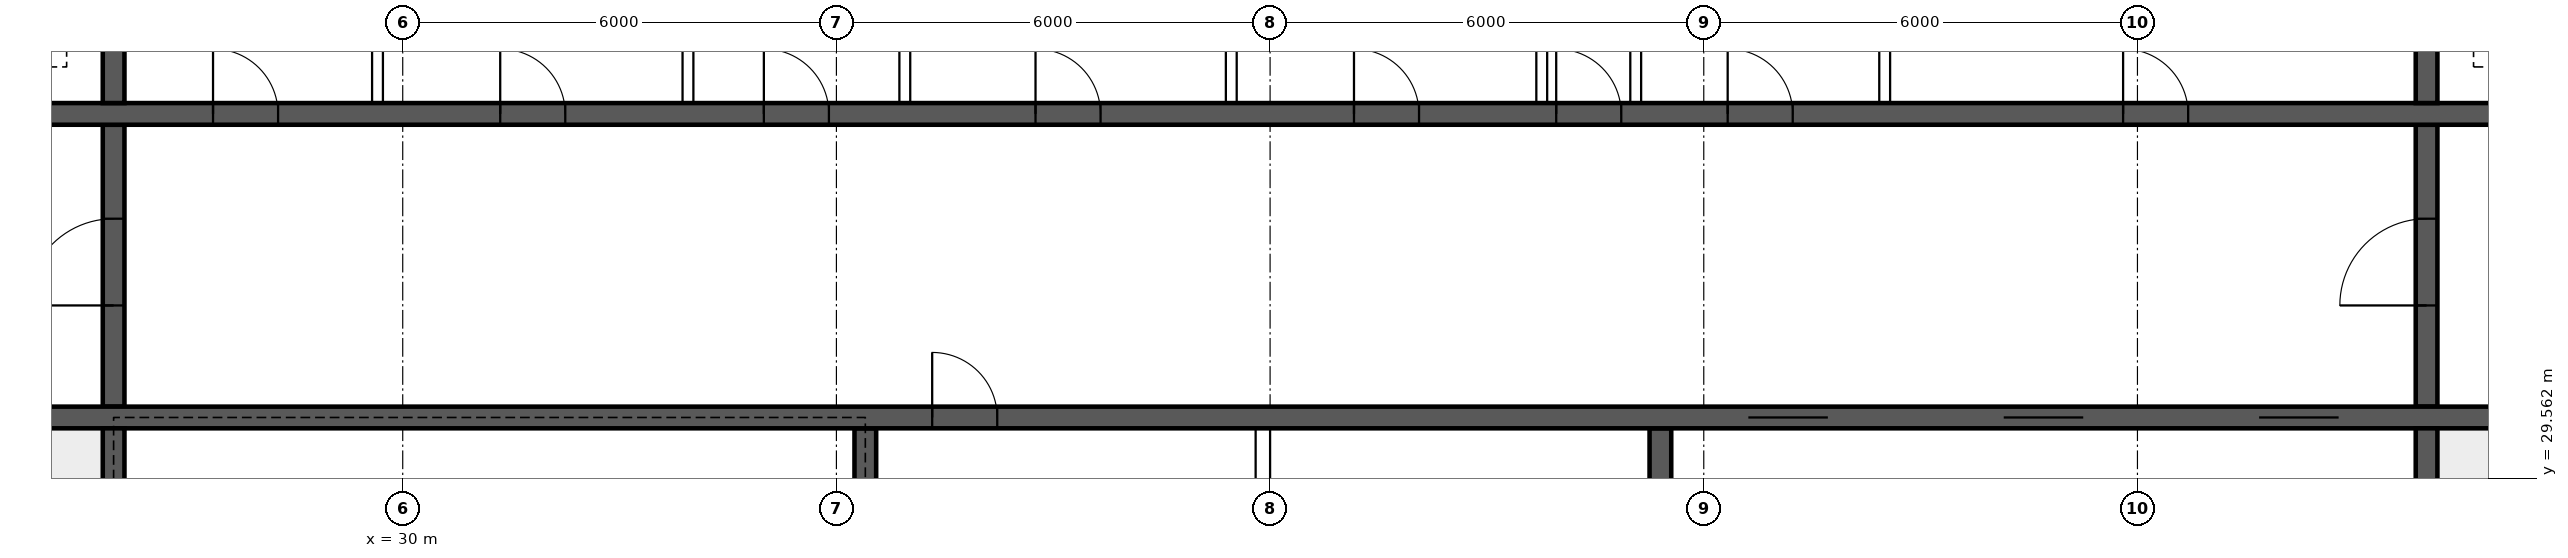
"""IFC4 building model, lengths in metres.
Left out: names, types, materials, properties, quantities, classifications, styles, units other than length and angle.
Written with IfcOpenShell. Run it as: python <this file> out.ifc"""

import sys

from ifc_helpers import new_model, si_unit, direction, frame, frame_2d, origin, place, context, subcontext, project, spatial, rectangle, extrude, element, fill, save


model = new_model("IFC4")
c1 = context("Model", 3, precision=1e-05, world=origin(), true_north=direction((0.0, 1.0)))
c2 = subcontext(c1, "Body", "Model", "MODEL_VIEW")
j1 = project(units=[si_unit("LENGTHUNIT", "METRE"), si_unit("PLANEANGLEUNIT", "RADIAN")], contexts=[c1])
p1 = place(None, origin())
s1 = spatial("IfcSite", under=j1, at=p1, CompositionType="ELEMENT")
p2 = place(p1, origin())
s2 = spatial("IfcBuilding", under=s1, at=p2, CompositionType="ELEMENT")
p3 = place(p2, frame((0.0, 0.0, 201.1)))
s3 = spatial("IfcBuildingStorey", under=s2, at=p3, CompositionType="ELEMENT", Elevation=201.1)
p4 = place(p3, frame((18.425, 30.4, 0.0), z_axis=(0.0, 0.0, 1.0), x_axis=(1.0, 0.0, 0.0)))
e1 = element("IfcWall", 1, at=p4, inside=s3, PredefinedType="SHEAR", context=c2, shape_type="SweptSolid", body=[
    extrude(rectangle(XDim=47.15, YDim=0.3, at=frame_2d((23.575, 0.0))), origin(), (0.0, 0.0, 1.0), 7.2),
])
p5 = place(p4, frame((0.4, 0.0, 0.0)))
e2 = element("IfcOpeningElement", 2, at=p5, cuts=e1, PredefinedType="OPENING", context=c2, shape_type="SweptSolid", body=[
    extrude(rectangle(XDim=1.0, YDim=2.1, at=frame_2d((0.5, 1.05))), frame((0.0, 0.16, 0.0), z_axis=(0.0, -1.0, 0.0), x_axis=(1.0, 0.0, 0.0)), (0.0, 0.0, 1.0), 0.32),
])
p6 = place(p4, frame((45.75, 0.0, 0.0)))
e3 = element("IfcOpeningElement", 3, at=p6, cuts=e1, PredefinedType="OPENING", context=c2, shape_type="SweptSolid", body=[
    extrude(rectangle(XDim=1.0, YDim=2.1, at=frame_2d((0.5, 1.05))), frame((0.0, 0.16, 0.0), z_axis=(0.0, -1.0, 0.0), x_axis=(1.0, 0.0, 0.0)), (0.0, 0.0, 1.0), 0.32),
])
p7 = place(p4, frame((18.9, 0.0, 0.0)))
e4 = element("IfcOpeningElement", 4, at=p7, cuts=e1, PredefinedType="OPENING", context=c2, shape_type="SweptSolid", body=[
    extrude(rectangle(XDim=0.9, YDim=2.1, at=frame_2d((0.45, 1.05))), frame((0.0, 0.16, 0.0), z_axis=(0.0, -1.0, 0.0), x_axis=(1.0, 0.0, 0.0)), (0.0, 0.0, 1.0), 0.32),
])
p8 = place(p4, frame((30.192, 0.0, 0.0)))
e5 = element("IfcOpeningElement", 5, at=p8, cuts=e1, PredefinedType="OPENING", context=c2, shape_type="SweptSolid", body=[
    extrude(rectangle(XDim=1.1, YDim=2.1, at=frame_2d((0.55, 1.05))), frame((0.0, 0.16, 0.0), z_axis=(0.0, -1.0, 0.0), x_axis=(1.0, 0.0, 0.0)), (0.0, 0.0, 1.0), 0.32),
])
p9 = place(p4, frame((33.725, 0.0, 0.0)))
e6 = element("IfcOpeningElement", 6, at=p9, cuts=e1, PredefinedType="OPENING", context=c2, shape_type="SweptSolid", body=[
    extrude(rectangle(XDim=1.1, YDim=2.1, at=frame_2d((0.55, 1.05))), frame((0.0, 0.16, 0.0), z_axis=(0.0, -1.0, 0.0), x_axis=(1.0, 0.0, 0.0)), (0.0, 0.0, 1.0), 0.32),
])
p10 = place(p4, frame((37.258, 0.0, 0.0)))
e7 = element("IfcOpeningElement", 7, at=p10, cuts=e1, PredefinedType="OPENING", context=c2, shape_type="SweptSolid", body=[
    extrude(rectangle(XDim=1.1, YDim=2.1, at=frame_2d((0.55, 1.05))), frame((0.0, 0.16, 0.0), z_axis=(0.0, -1.0, 0.0), x_axis=(1.0, 0.0, 0.0)), (0.0, 0.0, 1.0), 0.32),
])
p11 = place(p3, frame((18.425, 34.6, 0.0), z_axis=(0.0, 0.0, 1.0), x_axis=(1.0, 0.0, 0.0)))
e8 = element("IfcWall", 8, at=p11, inside=s3, PredefinedType="SHEAR", context=c2, shape_type="SweptSolid", body=[
    extrude(rectangle(XDim=47.15, YDim=0.3, at=frame_2d((23.575, 0.0))), origin(), (0.0, 0.0, 1.0), 7.2),
])
p12 = place(p11, frame((0.9, 0.0, 0.0)))
e9 = element("IfcOpeningElement", 9, at=p12, cuts=e8, PredefinedType="OPENING", context=c2, shape_type="SweptSolid", body=[
    extrude(rectangle(XDim=1.1, YDim=2.1, at=frame_2d((0.55, 1.05))), frame((0.0, 0.16, 0.0), z_axis=(0.0, -1.0, 0.0), x_axis=(1.0, 0.0, 0.0)), (0.0, 0.0, 1.0), 0.32),
])
p13 = place(p11, frame((45.15, 0.0, 0.0)))
e10 = element("IfcOpeningElement", 10, at=p13, cuts=e8, PredefinedType="OPENING", context=c2, shape_type="SweptSolid", body=[
    extrude(rectangle(XDim=1.1, YDim=2.1, at=frame_2d((0.55, 1.05))), frame((0.0, 0.16, 0.0), z_axis=(0.0, -1.0, 0.0), x_axis=(1.0, 0.0, 0.0)), (0.0, 0.0, 1.0), 0.32),
])
p14 = place(p11, frame((4.175, 0.0, 0.0)))
e11 = element("IfcOpeningElement", 11, at=p14, cuts=e8, PredefinedType="OPENING", context=c2, shape_type="SweptSolid", body=[
    extrude(rectangle(XDim=0.9, YDim=2.1, at=frame_2d((0.45, 1.05))), frame((0.0, 0.16, 0.0), z_axis=(0.0, -1.0, 0.0), x_axis=(1.0, 0.0, 0.0)), (0.0, 0.0, 1.0), 0.32),
])
p15 = place(p11, frame((42.075, 0.0, 0.0)))
e12 = element("IfcOpeningElement", 12, at=p15, cuts=e8, PredefinedType="OPENING", context=c2, shape_type="SweptSolid", body=[
    extrude(rectangle(XDim=0.9, YDim=2.1, at=frame_2d((0.45, 1.05))), frame((0.0, 0.16, 0.0), z_axis=(0.0, -1.0, 0.0), x_axis=(1.0, 0.0, 0.0)), (0.0, 0.0, 1.0), 0.32),
])
p16 = place(p11, frame((8.95, 0.0, 0.0)))
e13 = element("IfcOpeningElement", 13, at=p16, cuts=e8, PredefinedType="OPENING", context=c2, shape_type="SweptSolid", body=[
    extrude(rectangle(XDim=0.9, YDim=2.1, at=frame_2d((0.45, 1.05))), frame((0.0, 0.16, 0.0), z_axis=(0.0, -1.0, 0.0), x_axis=(1.0, 0.0, 0.0)), (0.0, 0.0, 1.0), 0.32),
])
p17 = place(p11, frame((12.924, 0.0, 0.0)))
e14 = element("IfcOpeningElement", 14, at=p17, cuts=e8, PredefinedType="OPENING", context=c2, shape_type="SweptSolid", body=[
    extrude(rectangle(XDim=0.9, YDim=2.1, at=frame_2d((0.45, 1.05))), frame((0.0, 0.16, 0.0), z_axis=(0.0, -1.0, 0.0), x_axis=(1.0, 0.0, 0.0)), (0.0, 0.0, 1.0), 0.32),
])
p18 = place(p11, frame((16.571, 0.0, 0.0)))
e15 = element("IfcOpeningElement", 15, at=p18, cuts=e8, PredefinedType="OPENING", context=c2, shape_type="SweptSolid", body=[
    extrude(rectangle(XDim=0.9, YDim=2.1, at=frame_2d((0.45, 1.05))), frame((0.0, 0.16, 0.0), z_axis=(0.0, -1.0, 0.0), x_axis=(1.0, 0.0, 0.0)), (0.0, 0.0, 1.0), 0.32),
])
p19 = place(p11, frame((20.33, 0.0, 0.0)))
e16 = element("IfcOpeningElement", 16, at=p19, cuts=e8, PredefinedType="OPENING", context=c2, shape_type="SweptSolid", body=[
    extrude(rectangle(XDim=0.9, YDim=2.1, at=frame_2d((0.45, 1.05))), frame((0.0, 0.16, 0.0), z_axis=(0.0, -1.0, 0.0), x_axis=(1.0, 0.0, 0.0)), (0.0, 0.0, 1.0), 0.32),
])
p20 = place(p11, frame((24.736, 0.0, 0.0)))
e17 = element("IfcOpeningElement", 17, at=p20, cuts=e8, PredefinedType="OPENING", context=c2, shape_type="SweptSolid", body=[
    extrude(rectangle(XDim=0.9, YDim=2.1, at=frame_2d((0.45, 1.05))), frame((0.0, 0.16, 0.0), z_axis=(0.0, -1.0, 0.0), x_axis=(1.0, 0.0, 0.0)), (0.0, 0.0, 1.0), 0.32),
])
p21 = place(p11, frame((27.533, 0.0, 0.0)))
e18 = element("IfcOpeningElement", 18, at=p21, cuts=e8, PredefinedType="OPENING", context=c2, shape_type="SweptSolid", body=[
    extrude(rectangle(XDim=0.9, YDim=2.1, at=frame_2d((0.45, 1.05))), frame((0.0, 0.16, 0.0), z_axis=(0.0, -1.0, 0.0), x_axis=(1.0, 0.0, 0.0)), (0.0, 0.0, 1.0), 0.32),
])
p22 = place(p11, frame((29.906, 0.0, 0.0)))
e19 = element("IfcOpeningElement", 19, at=p22, cuts=e8, PredefinedType="OPENING", context=c2, shape_type="SweptSolid", body=[
    extrude(rectangle(XDim=0.9, YDim=2.1, at=frame_2d((0.45, 1.05))), frame((0.0, 0.16, 0.0), z_axis=(0.0, -1.0, 0.0), x_axis=(1.0, 0.0, 0.0)), (0.0, 0.0, 1.0), 0.32),
])
p23 = place(p11, frame((35.376, 0.0, 0.0)))
e20 = element("IfcOpeningElement", 20, at=p23, cuts=e8, PredefinedType="OPENING", context=c2, shape_type="SweptSolid", body=[
    extrude(rectangle(XDim=0.9, YDim=2.1, at=frame_2d((0.45, 1.05))), frame((0.0, 0.16, 0.0), z_axis=(0.0, -1.0, 0.0), x_axis=(1.0, 0.0, 0.0)), (0.0, 0.0, 1.0), 0.32),
])
for number, where, z_axis, x_axis in (
    (21, (26.0, 26.225, 0.0), (0.0, 0.0, 1.0), (0.0, 1.0, 0.0)),
    (22, (58.0, 26.225, 0.0), (0.0, 0.0, 1.0), (0.0, 1.0, 0.0)),
):
    element("IfcWall", number, at=place(p3, frame(where, z_axis=z_axis, x_axis=x_axis)), inside=s3, PredefinedType="SHEAR", context=c2, shape_type="SweptSolid", body=[
        extrude(rectangle(XDim=4.025, YDim=0.3, at=frame_2d((2.012, 0.0))), origin(), (0.0, 0.0, 1.0), 7.2),
    ])
p24 = place(p3, frame((26.0, 30.55, 0.0), z_axis=(0.0, 0.0, 1.0), x_axis=(0.0, 1.0, 0.0)))
e23 = element("IfcWall", 23, at=p24, inside=s3, PredefinedType="SHEAR", context=c2, shape_type="SweptSolid", body=[
    extrude(rectangle(XDim=3.9, YDim=0.3, at=frame_2d((1.95, 0.0))), origin(), (0.0, 0.0, 1.0), 7.2),
])
p25 = place(p24, frame((1.4, 0.0, 0.0)))
e24 = element("IfcOpeningElement", 24, at=p25, cuts=e23, PredefinedType="OPENING", context=c2, shape_type="SweptSolid", body=[
    extrude(rectangle(XDim=1.2, YDim=2.1, at=frame_2d((0.6, 1.05))), frame((0.0, 0.16, 0.0), z_axis=(0.0, -1.0, 0.0), x_axis=(1.0, 0.0, 0.0)), (0.0, 0.0, 1.0), 0.32),
])
p26 = place(p3, frame((58.0, 30.55, 0.0), z_axis=(0.0, 0.0, 1.0), x_axis=(0.0, 1.0, 0.0)))
e25 = element("IfcWall", 25, at=p26, inside=s3, PredefinedType="SHEAR", context=c2, shape_type="SweptSolid", body=[
    extrude(rectangle(XDim=3.9, YDim=0.3, at=frame_2d((1.95, 0.0))), origin(), (0.0, 0.0, 1.0), 7.2),
])
p27 = place(p26, frame((1.4, 0.0, 0.0)))
e26 = element("IfcOpeningElement", 26, at=p27, cuts=e25, PredefinedType="OPENING", context=c2, shape_type="SweptSolid", body=[
    extrude(rectangle(XDim=1.2, YDim=2.1, at=frame_2d((0.6, 1.05))), frame((0.0, 0.16, 0.0), z_axis=(0.0, -1.0, 0.0), x_axis=(1.0, 0.0, 0.0)), (0.0, 0.0, 1.0), 0.32),
])
for number, where, z_axis, x_axis in (
    (27, (26.0, 34.75, 0.0), (0.0, 0.0, 1.0), (0.0, 1.0, 0.0)),
    (28, (58.0, 34.75, 0.0), (0.0, 0.0, 1.0), (0.0, 1.0, 0.0)),
):
    element("IfcWall", number, at=place(p3, frame(where, z_axis=z_axis, x_axis=x_axis)), inside=s3, PredefinedType="SHEAR", context=c2, shape_type="SweptSolid", body=[
        extrude(rectangle(XDim=3.025, YDim=0.3, at=frame_2d((1.512, 0.0))), origin(), (0.0, 0.0, 1.0), 7.2),
    ])
for number, where, z_axis, x_axis in (
    (29, (36.4, 26.225, 0.0), (0.0, 0.0, 1.0), (0.0, 1.0, 0.0)),
    (30, (47.4, 26.225, 0.0), (0.0, 0.0, 1.0), (0.0, 1.0, 0.0)),
):
    element("IfcWall", number, at=place(p3, frame(where, z_axis=z_axis, x_axis=x_axis)), inside=s3, PredefinedType="SHEAR", context=c2, shape_type="SweptSolid", body=[
        extrude(rectangle(XDim=4.025, YDim=0.3, at=frame_2d((2.012, 0.0))), origin(), (0.0, 0.0, 1.0), 7.2),
    ])
for number, where, z_axis, x_axis in (
    (31, (29.651, 34.75, 0.0), (0.0, 0.0, 1.0), (0.0, 1.0, 0.0)),
    (32, (33.946, 34.75, 0.0), (0.0, 0.0, 1.0), (0.0, 1.0, 0.0)),
    (33, (36.946, 34.75, 0.0), (0.0, 0.0, 1.0), (0.0, 1.0, 0.0)),
    (34, (41.463, 34.75, 0.0), (0.0, 0.0, 1.0), (0.0, 1.0, 0.0)),
    (35, (45.758, 34.75, 0.0), (0.0, 0.0, 1.0), (0.0, 1.0, 0.0)),
    (36, (47.058, 34.75, 0.0), (0.0, 0.0, 1.0), (0.0, 1.0, 0.0)),
    (37, (50.503, 34.75, 0.0), (0.0, 0.0, 1.0), (0.0, 1.0, 0.0)),
):
    element("IfcWall", number, at=place(p3, frame(where, z_axis=z_axis, x_axis=x_axis)), inside=s3, PredefinedType="SOLIDWALL", context=c2, shape_type="SweptSolid", body=[
        extrude(rectangle(XDim=3.025, YDim=0.15, at=frame_2d((1.512, 0.0))), origin(), (0.0, 0.0, 1.0), 6.9),
    ])
p28 = place(p3, frame((41.9, 26.225, 0.0), z_axis=(0.0, 0.0, 1.0), x_axis=(0.0, 1.0, 0.0)))
e38 = element("IfcWall", 38, at=p28, inside=s3, PredefinedType="SOLIDWALL", context=c2, shape_type="SweptSolid", body=[
    extrude(rectangle(XDim=4.025, YDim=0.2, at=frame_2d((2.012, 0.0))), origin(), (0.0, 0.0, 1.0), 6.9),
])
p29 = place(p25, origin())
e39 = element("IfcDoor", 39, at=p29, inside=s3, OperationType="SINGLE_SWING_LEFT", PredefinedType="DOOR", context=c2, shape_type="SweptSolid", body=[
    extrude(rectangle(XDim=1.2, YDim=2.1, at=frame_2d((0.6, 1.05))), frame((0.0, 0.025, 0.0), z_axis=(0.0, -1.0, 0.0), x_axis=(1.0, 0.0, 0.0)), (0.0, 0.0, 1.0), 0.05),
])
fill(e24, e39)
p30 = place(p27, origin())
e40 = element("IfcDoor", 40, at=p30, inside=s3, OperationType="SINGLE_SWING_LEFT", PredefinedType="DOOR", context=c2, shape_type="SweptSolid", body=[
    extrude(rectangle(XDim=1.2, YDim=2.1, at=frame_2d((0.6, 1.05))), frame((0.0, 0.025, 0.0), z_axis=(0.0, -1.0, 0.0), x_axis=(1.0, 0.0, 0.0)), (0.0, 0.0, 1.0), 0.05),
])
fill(e26, e40)
p31 = place(p16, origin())
e41 = element("IfcDoor", 41, at=p31, inside=s3, OperationType="SINGLE_SWING_LEFT", PredefinedType="DOOR", context=c2, shape_type="SweptSolid", body=[
    extrude(rectangle(XDim=0.9, YDim=2.1, at=frame_2d((0.45, 1.05))), frame((0.0, 0.025, 0.0), z_axis=(0.0, -1.0, 0.0), x_axis=(1.0, 0.0, 0.0)), (0.0, 0.0, 1.0), 0.05),
])
fill(e13, e41)
p32 = place(p17, origin())
e42 = element("IfcDoor", 42, at=p32, inside=s3, OperationType="SINGLE_SWING_LEFT", PredefinedType="DOOR", context=c2, shape_type="SweptSolid", body=[
    extrude(rectangle(XDim=0.9, YDim=2.1, at=frame_2d((0.45, 1.05))), frame((0.0, 0.025, 0.0), z_axis=(0.0, -1.0, 0.0), x_axis=(1.0, 0.0, 0.0)), (0.0, 0.0, 1.0), 0.05),
])
fill(e14, e42)
p33 = place(p18, origin())
e43 = element("IfcDoor", 43, at=p33, inside=s3, OperationType="SINGLE_SWING_LEFT", PredefinedType="DOOR", context=c2, shape_type="SweptSolid", body=[
    extrude(rectangle(XDim=0.9, YDim=2.1, at=frame_2d((0.45, 1.05))), frame((0.0, 0.025, 0.0), z_axis=(0.0, -1.0, 0.0), x_axis=(1.0, 0.0, 0.0)), (0.0, 0.0, 1.0), 0.05),
])
fill(e15, e43)
p34 = place(p19, origin())
e44 = element("IfcDoor", 44, at=p34, inside=s3, OperationType="SINGLE_SWING_LEFT", PredefinedType="DOOR", context=c2, shape_type="SweptSolid", body=[
    extrude(rectangle(XDim=0.9, YDim=2.1, at=frame_2d((0.45, 1.05))), frame((0.0, 0.025, 0.0), z_axis=(0.0, -1.0, 0.0), x_axis=(1.0, 0.0, 0.0)), (0.0, 0.0, 1.0), 0.05),
])
fill(e16, e44)
p35 = place(p20, origin())
e45 = element("IfcDoor", 45, at=p35, inside=s3, OperationType="SINGLE_SWING_LEFT", PredefinedType="DOOR", context=c2, shape_type="SweptSolid", body=[
    extrude(rectangle(XDim=0.9, YDim=2.1, at=frame_2d((0.45, 1.05))), frame((0.0, 0.025, 0.0), z_axis=(0.0, -1.0, 0.0), x_axis=(1.0, 0.0, 0.0)), (0.0, 0.0, 1.0), 0.05),
])
fill(e17, e45)
p36 = place(p21, origin())
e46 = element("IfcDoor", 46, at=p36, inside=s3, OperationType="SINGLE_SWING_LEFT", PredefinedType="DOOR", context=c2, shape_type="SweptSolid", body=[
    extrude(rectangle(XDim=0.9, YDim=2.1, at=frame_2d((0.45, 1.05))), frame((0.0, 0.025, 0.0), z_axis=(0.0, -1.0, 0.0), x_axis=(1.0, 0.0, 0.0)), (0.0, 0.0, 1.0), 0.05),
])
fill(e18, e46)
p37 = place(p22, origin())
e47 = element("IfcDoor", 47, at=p37, inside=s3, OperationType="SINGLE_SWING_LEFT", PredefinedType="DOOR", context=c2, shape_type="SweptSolid", body=[
    extrude(rectangle(XDim=0.9, YDim=2.1, at=frame_2d((0.45, 1.05))), frame((0.0, 0.025, 0.0), z_axis=(0.0, -1.0, 0.0), x_axis=(1.0, 0.0, 0.0)), (0.0, 0.0, 1.0), 0.05),
])
fill(e19, e47)
p38 = place(p23, origin())
e48 = element("IfcDoor", 48, at=p38, inside=s3, OperationType="SINGLE_SWING_LEFT", PredefinedType="DOOR", context=c2, shape_type="SweptSolid", body=[
    extrude(rectangle(XDim=0.9, YDim=2.1, at=frame_2d((0.45, 1.05))), frame((0.0, 0.025, 0.0), z_axis=(0.0, -1.0, 0.0), x_axis=(1.0, 0.0, 0.0)), (0.0, 0.0, 1.0), 0.05),
])
fill(e20, e48)
p39 = place(p7, origin())
e49 = element("IfcDoor", 49, at=p39, inside=s3, OperationType="SINGLE_SWING_LEFT", PredefinedType="DOOR", context=c2, shape_type="SweptSolid", body=[
    extrude(rectangle(XDim=0.9, YDim=2.1, at=frame_2d((0.45, 1.05))), frame((0.0, 0.025, 0.0), z_axis=(0.0, -1.0, 0.0), x_axis=(1.0, 0.0, 0.0)), (0.0, 0.0, 1.0), 0.05),
])
fill(e4, e49)
p40 = place(p8, origin())
e50 = element("IfcDoor", 50, at=p40, inside=s3, OperationType="DOUBLE_DOOR_SLIDING", PredefinedType="DOOR", context=c2, shape_type="SweptSolid", body=[
    extrude(rectangle(XDim=1.1, YDim=2.1, at=frame_2d((0.55, 1.05))), frame((0.0, 0.025, 0.0), z_axis=(0.0, -1.0, 0.0), x_axis=(1.0, 0.0, 0.0)), (0.0, 0.0, 1.0), 0.05),
])
fill(e5, e50)
p41 = place(p9, origin())
e51 = element("IfcDoor", 51, at=p41, inside=s3, OperationType="DOUBLE_DOOR_SLIDING", PredefinedType="DOOR", context=c2, shape_type="SweptSolid", body=[
    extrude(rectangle(XDim=1.1, YDim=2.1, at=frame_2d((0.55, 1.05))), frame((0.0, 0.025, 0.0), z_axis=(0.0, -1.0, 0.0), x_axis=(1.0, 0.0, 0.0)), (0.0, 0.0, 1.0), 0.05),
])
fill(e6, e51)
p42 = place(p10, origin())
e52 = element("IfcDoor", 52, at=p42, inside=s3, OperationType="DOUBLE_DOOR_SLIDING", PredefinedType="DOOR", context=c2, shape_type="SweptSolid", body=[
    extrude(rectangle(XDim=1.1, YDim=2.1, at=frame_2d((0.55, 1.05))), frame((0.0, 0.025, 0.0), z_axis=(0.0, -1.0, 0.0), x_axis=(1.0, 0.0, 0.0)), (0.0, 0.0, 1.0), 0.05),
])
fill(e7, e52)
save(model, sys.argv[1])
